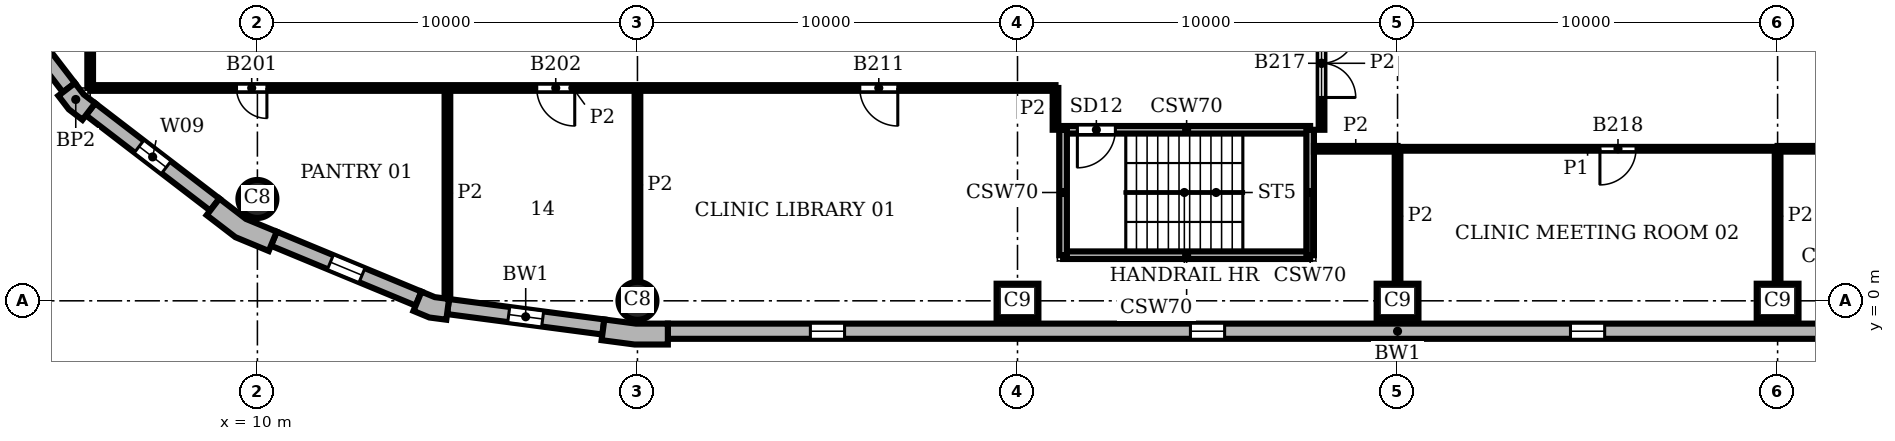
"""IFC4 building model, lengths in metres.
Left out: names, types, materials, properties, quantities, classifications, styles, units other than length and angle.
Written with IfcOpenShell. Run it as: python <this file> out.ifc"""

import sys

from ifc_helpers import new_model, si_unit, direction, frame, frame_2d, origin, origin_2d, place, context, subcontext, project, spatial, polyline, rectangle, circle, outline, extrude, element, fill, save


model = new_model("IFC4")
c1 = context("Model", 3, precision=1e-05, world=origin(), true_north=direction((0.0, 1.0)))
c2 = subcontext(c1, "Body", "Model", "MODEL_VIEW")
j1 = project(units=[si_unit("LENGTHUNIT", "METRE"), si_unit("PLANEANGLEUNIT", "RADIAN")], contexts=[c1])
p1 = place(None, origin())
s1 = spatial("IfcSite", under=j1, at=p1, CompositionType="ELEMENT")
p2 = place(p1, origin())
s2 = spatial("IfcBuilding", under=s1, at=p2, CompositionType="ELEMENT")
p3 = place(p2, frame((0.0, 0.0, 143.4)))
s3 = spatial("IfcBuildingStorey", under=s2, at=p3, CompositionType="ELEMENT", Elevation=143.4)
p4 = place(p3, frame((20.0, 0.0, 0.0), z_axis=(0.0, 0.0, 1.0), x_axis=(1.0, 0.0, 0.0)))
e1 = element("IfcColumn", 1, at=p4, inside=s3, PredefinedType="COLUMN", context=c2, shape_type="SweptSolid", body=[
    extrude(circle(Radius=0.5, at=origin_2d()), origin(), (0.0, 0.0, 1.0), 3.9),
])
for number, where, z_axis, x_axis in (
    (2, (30.0, 0.0, 0.0), (0.0, 0.0, 1.0), (1.0, 0.0, 0.0)),
    (3, (40.0, 0.0, 0.0), (0.0, 0.0, 1.0), (1.0, 0.0, 0.0)),
    (4, (50.0, 0.0, 0.0), (0.0, 0.0, 1.0), (1.0, 0.0, 0.0)),
):
    element("IfcColumn", number, at=place(p3, frame(where, z_axis=z_axis, x_axis=x_axis)), inside=s3, PredefinedType="COLUMN", context=c2, shape_type="SweptSolid", body=[
        extrude(rectangle(XDim=1.1, YDim=0.9, at=origin_2d()), origin(), (0.0, 0.0, 1.0), 3.9),
    ])
p5 = place(p3, frame((10.0, 2.679, 0.0), z_axis=(0.0, 0.0, 1.0), x_axis=(1.0, 0.0, 0.0)))
e5 = element("IfcColumn", 5, at=p5, inside=s3, PredefinedType="COLUMN", context=c2, shape_type="SweptSolid", body=[
    extrude(circle(Radius=0.5, at=origin_2d()), origin(), (0.0, 0.0, 1.0), 3.9),
])
p6 = place(p3, origin())
e6 = element("IfcWall", 6, at=p6, inside=s3, PredefinedType="SOLIDWALL", context=c2, shape_type="SweptSolid", body=[
    extrude(outline(polyline([(19.076, -0.887), (19.057, -1.036), (19.925, -1.15), (20.8, -1.15), (20.8, -1.0), (20.8, -0.6), (19.961, -0.6), (19.128, -0.49), (19.076, -0.887)])), origin(), (0.0, 0.0, 1.0), 3.9),
])
e7 = element("IfcWall", 7, at=p6, inside=s3, PredefinedType="SOLIDWALL", context=c2, shape_type="SweptSolid", body=[
    extrude(outline(polyline([(4.882, 5.487), (4.763, 5.396), (5.038, 5.038), (5.396, 4.763), (5.487, 4.882), (5.731, 5.199), (5.43, 5.43), (5.199, 5.731), (4.882, 5.487)])), origin(), (0.0, 0.0, 1.0), 3.9),
])
e8 = element("IfcWall", 8, at=p6, inside=s3, PredefinedType="SOLIDWALL", context=c2, shape_type="SweptSolid", body=[
    extrude(outline(polyline([(8.757, 2.373), (8.665, 2.254), (9.42, 1.675), (10.299, 1.311), (10.356, 1.449), (10.51, 1.819), (9.698, 2.155), (9.0, 2.69), (8.757, 2.373)])), origin(), (0.0, 0.0, 1.0), 3.9),
])
e9 = element("IfcWall", 9, at=p6, inside=s3, PredefinedType="SOLIDWALL", context=c2, shape_type="SweptSolid", body=[
    extrude(outline(polyline([(14.164, -0.128), (14.106, -0.266), (14.523, -0.439), (14.971, -0.498), (14.99, -0.349), (15.043, 0.047), (14.667, 0.097), (14.317, 0.242), (14.164, -0.128)])), origin(), (0.0, 0.0, 1.0), 3.9),
])
p7 = place(p3, frame((20.8, -0.8, 0.0), z_axis=(0.0, 0.0, 1.0), x_axis=(1.0, 0.0, 0.0)))
e10 = element("IfcWall", 10, at=p7, inside=s3, PredefinedType="SOLIDWALL", context=c2, shape_type="SweptSolid", body=[
    extrude(rectangle(XDim=38.4, YDim=0.4, at=frame_2d((19.2, 0.0))), origin(), (0.0, 0.0, 1.0), 3.9),
])
p8 = place(p7, frame((3.75, 0.0, 0.9)))
e11 = element("IfcOpeningElement", 11, at=p8, cuts=e10, PredefinedType="OPENING", context=c2, shape_type="SweptSolid", body=[
    extrude(rectangle(XDim=0.9, YDim=2.35, at=frame_2d((0.45, 1.175))), frame((0.0, 0.21, 0.0), z_axis=(0.0, -1.0, 0.0), x_axis=(1.0, 0.0, 0.0)), (0.0, 0.0, 1.0), 0.42),
])
p9 = place(p7, frame((13.75, 0.0, 0.9)))
e12 = element("IfcOpeningElement", 12, at=p9, cuts=e10, PredefinedType="OPENING", context=c2, shape_type="SweptSolid", body=[
    extrude(rectangle(XDim=0.9, YDim=2.35, at=frame_2d((0.45, 1.175))), frame((0.0, 0.21, 0.0), z_axis=(0.0, -1.0, 0.0), x_axis=(1.0, 0.0, 0.0)), (0.0, 0.0, 1.0), 0.42),
])
p10 = place(p7, frame((23.75, 0.0, 0.9)))
e13 = element("IfcOpeningElement", 13, at=p10, cuts=e10, PredefinedType="OPENING", context=c2, shape_type="SweptSolid", body=[
    extrude(rectangle(XDim=0.9, YDim=2.35, at=frame_2d((0.45, 1.175))), frame((0.0, 0.21, 0.0), z_axis=(0.0, -1.0, 0.0), x_axis=(1.0, 0.0, 0.0)), (0.0, 0.0, 1.0), 0.42),
])
p11 = place(p7, frame((33.75, 0.0, 0.9)))
e14 = element("IfcOpeningElement", 14, at=p11, cuts=e10, PredefinedType="OPENING", context=c2, shape_type="SweptSolid", body=[
    extrude(rectangle(XDim=0.9, YDim=2.35, at=frame_2d((0.45, 1.175))), frame((0.0, 0.21, 0.0), z_axis=(0.0, -1.0, 0.0), x_axis=(1.0, 0.0, 0.0)), (0.0, 0.0, 1.0), 0.42),
])
p12 = place(p3, frame((2.532, 8.878, 0.0), z_axis=(0.0, 0.0, 1.0), x_axis=(0.608759824817, -0.793354571229, 0.0)))
e15 = element("IfcWall", 15, at=p12, inside=s3, PredefinedType="SOLIDWALL", context=c2, shape_type="SweptSolid", body=[
    extrude(rectangle(XDim=4.121, YDim=0.4, at=frame_2d((2.061, 0.0))), origin(), (0.0, 0.0, 1.0), 3.9),
])
p13 = place(p12, frame((1.611, 0.0, 0.9)))
e16 = element("IfcOpeningElement", 16, at=p13, cuts=e15, PredefinedType="OPENING", context=c2, shape_type="SweptSolid", body=[
    extrude(rectangle(XDim=0.9, YDim=2.35, at=frame_2d((0.45, 1.175))), frame((0.0, 0.21, 0.0), z_axis=(0.0, -1.0, 0.0), x_axis=(1.0, 0.0, 0.0)), (0.0, 0.0, 1.0), 0.42),
])
p14 = place(p3, frame((5.609, 5.041, 0.0), z_axis=(0.0, 0.0, 1.0), x_axis=(0.793354571229, -0.608759824817, 0.0)))
e17 = element("IfcWall", 17, at=p14, inside=s3, PredefinedType="SOLIDWALL", context=c2, shape_type="SweptSolid", body=[
    extrude(rectangle(XDim=4.121, YDim=0.4, at=frame_2d((2.061, 0.0))), origin(), (0.0, 0.0, 1.0), 3.9),
])
p15 = place(p14, frame((1.611, 0.0, 0.9)))
e18 = element("IfcOpeningElement", 18, at=p15, cuts=e17, PredefinedType="OPENING", context=c2, shape_type="SweptSolid", body=[
    extrude(rectangle(XDim=0.9, YDim=2.35, at=frame_2d((0.45, 1.175))), frame((0.0, 0.21, 0.0), z_axis=(0.0, -1.0, 0.0), x_axis=(1.0, 0.0, 0.0)), (0.0, 0.0, 1.0), 0.42),
])
p16 = place(p3, frame((10.433, 1.634, 0.0), z_axis=(0.0, 0.0, 1.0), x_axis=(0.923863744394, -0.382721546029, 0.0)))
e19 = element("IfcWall", 19, at=p16, inside=s3, PredefinedType="SOLIDWALL", context=c2, shape_type="SweptSolid", body=[
    extrude(rectangle(XDim=4.121, YDim=0.4, at=frame_2d((2.061, 0.0))), origin(), (0.0, 0.0, 1.0), 3.9),
])
p17 = place(p16, frame((1.611, 0.0, 0.9)))
e20 = element("IfcOpeningElement", 20, at=p17, cuts=e19, PredefinedType="OPENING", context=c2, shape_type="SweptSolid", body=[
    extrude(rectangle(XDim=0.9, YDim=2.35, at=frame_2d((0.45, 1.175))), frame((0.0, 0.21, 0.0), z_axis=(0.0, -1.0, 0.0), x_axis=(1.0, 0.0, 0.0)), (0.0, 0.0, 1.0), 0.42),
])
p18 = place(p3, frame((15.017, -0.151, 0.0), z_axis=(0.0, 0.0, 1.0), x_axis=(0.991446429508, -0.130514280502, 0.0)))
e21 = element("IfcWall", 21, at=p18, inside=s3, PredefinedType="SOLIDWALL", context=c2, shape_type="SweptSolid", body=[
    extrude(rectangle(XDim=4.121, YDim=0.4, at=frame_2d((2.061, 0.0))), origin(), (0.0, 0.0, 1.0), 3.9),
])
p19 = place(p18, frame((1.611, 0.0, 0.9)))
e22 = element("IfcOpeningElement", 22, at=p19, cuts=e21, PredefinedType="OPENING", context=c2, shape_type="SweptSolid", body=[
    extrude(rectangle(XDim=0.9, YDim=2.35, at=frame_2d((0.45, 1.175))), frame((0.0, 0.21, 0.0), z_axis=(0.0, -1.0, 0.0), x_axis=(1.0, 0.0, 0.0)), (0.0, 0.0, 1.0), 0.42),
])
p20 = place(p3, frame((31.2, 1.2, 0.0), z_axis=(0.0, 0.0, 1.0), x_axis=(1.0, 0.0, 0.0)))
e23 = element("IfcWall", 23, at=p20, inside=s3, PredefinedType="SHEAR", context=c2, shape_type="SweptSolid", body=[
    extrude(rectangle(XDim=6.5, YDim=0.2, at=frame_2d((3.25, 0.0))), origin(), (0.0, 0.0, 1.0), 3.58),
])
p21 = place(p3, frame((31.2, 4.5, 0.0), z_axis=(0.0, 0.0, 1.0), x_axis=(1.0, 0.0, 0.0)))
e24 = element("IfcWall", 24, at=p21, inside=s3, PredefinedType="SHEAR", context=c2, shape_type="SweptSolid", body=[
    extrude(rectangle(XDim=6.5, YDim=0.2, at=frame_2d((3.25, 0.0))), origin(), (0.0, 0.0, 1.0), 3.58),
])
p22 = place(p21, frame((0.375, 0.0, 0.0)))
e25 = element("IfcOpeningElement", 25, at=p22, cuts=e24, PredefinedType="OPENING", context=c2, shape_type="SweptSolid", body=[
    extrude(rectangle(XDim=1.0, YDim=2.1, at=frame_2d((0.5, 1.05))), frame((0.0, 0.11, 0.0), z_axis=(0.0, -1.0, 0.0), x_axis=(1.0, 0.0, 0.0)), (0.0, 0.0, 1.0), 0.22),
])
for number, where, z_axis, x_axis in (
    (26, (31.2, 1.2, 0.0), (0.0, 0.0, 1.0), (0.0, 1.0, 0.0)),
    (27, (37.7, 1.2, 0.0), (0.0, 0.0, 1.0), (0.0, 1.0, 0.0)),
):
    element("IfcWall", number, at=place(p3, frame(where, z_axis=z_axis, x_axis=x_axis)), inside=s3, PredefinedType="SHEAR", context=c2, shape_type="SweptSolid", body=[
        extrude(rectangle(XDim=3.3, YDim=0.2, at=frame_2d((1.65, 0.0))), origin(), (0.0, 0.0, 1.0), 3.58),
    ])
p23 = place(p3, frame((40.0, 4.0, 0.0), z_axis=(0.0, 0.0, 1.0), x_axis=(1.0, 0.0, 0.0)))
e28 = element("IfcWall", 28, at=p23, inside=s3, PredefinedType="PARTITIONING", context=c2, shape_type="SweptSolid", body=[
    extrude(rectangle(XDim=10.0, YDim=0.1, at=frame_2d((5.0, 0.0))), origin(), (0.0, 0.0, 1.0), 3.58),
])
p24 = place(p23, frame((5.325, 0.0, 0.0)))
e29 = element("IfcOpeningElement", 29, at=p24, cuts=e28, PredefinedType="OPENING", context=c2, shape_type="SweptSolid", body=[
    extrude(rectangle(XDim=0.95, YDim=2.1, at=frame_2d((0.475, 1.05))), frame((0.0, 0.06, 0.0), z_axis=(0.0, -1.0, 0.0), x_axis=(1.0, 0.0, 0.0)), (0.0, 0.0, 1.0), 0.12),
])
p25 = place(p3, frame((5.6, 5.6, 0.0), z_axis=(0.0, 0.0, 1.0), x_axis=(0.0, 1.0, 0.0)))
e30 = element("IfcWall", 30, at=p25, inside=s3, PredefinedType="PARTITIONING", context=c2, shape_type="SweptSolid", body=[
    extrude(rectangle(XDim=22.4, YDim=0.15, at=frame_2d((11.2, 0.0))), origin(), (0.0, 0.0, 1.0), 3.58),
])
p26 = place(p25, frame((12.35, 0.0, 0.0)))
e31 = element("IfcOpeningElement", 31, at=p26, cuts=e30, PredefinedType="OPENING", context=c2, shape_type="SweptSolid", body=[
    extrude(rectangle(XDim=1.8, YDim=2.1, at=frame_2d((0.9, 1.05))), frame((0.0, 0.085, 0.0), z_axis=(0.0, -1.0, 0.0), x_axis=(1.0, 0.0, 0.0)), (0.0, 0.0, 1.0), 0.17),
])
p27 = place(p3, frame((15.0, 0.063, 0.0), z_axis=(0.0, 0.0, 1.0), x_axis=(0.0, 1.0, 0.0)))
e32 = element("IfcWall", 32, at=p27, inside=s3, PredefinedType="PARTITIONING", context=c2, shape_type="SweptSolid", body=[
    extrude(rectangle(XDim=5.537, YDim=0.15, at=frame_2d((2.769, 0.0))), origin(), (0.0, 0.0, 1.0), 3.58),
])
p28 = place(p3, frame((20.0, 0.5, 0.0), z_axis=(0.0, 0.0, 1.0), x_axis=(0.0, 1.0, 0.0)))
e33 = element("IfcWall", 33, at=p28, inside=s3, PredefinedType="PARTITIONING", context=c2, shape_type="SweptSolid", body=[
    extrude(rectangle(XDim=5.1, YDim=0.15, at=frame_2d((2.55, 0.0))), origin(), (0.0, 0.0, 1.0), 3.58),
])
p29 = place(p3, frame((31.0, 4.501, 0.0), z_axis=(0.0, 0.0, 1.0), x_axis=(0.0, 1.0, 0.0)))
e34 = element("IfcWall", 34, at=p29, inside=s3, PredefinedType="PARTITIONING", context=c2, shape_type="SweptSolid", body=[
    extrude(rectangle(XDim=1.099, YDim=0.15, at=frame_2d((0.55, 0.0))), origin(), (0.0, 0.0, 1.0), 3.58),
])
p30 = place(p3, frame((38.0, 4.5, 0.0), z_axis=(0.0, 0.0, 1.0), x_axis=(0.0, 1.0, 0.0)))
e35 = element("IfcWall", 35, at=p30, inside=s3, PredefinedType="PARTITIONING", context=c2, shape_type="SweptSolid", body=[
    extrude(rectangle(XDim=3.5, YDim=0.15, at=frame_2d((1.75, 0.0))), origin(), (0.0, 0.0, 1.0), 3.58),
])
p31 = place(p30, frame((0.85, 0.0, 0.0)))
e36 = element("IfcOpeningElement", 36, at=p31, cuts=e35, PredefinedType="OPENING", context=c2, shape_type="SweptSolid", body=[
    extrude(rectangle(XDim=1.8, YDim=2.1, at=frame_2d((0.9, 1.05))), frame((0.0, 0.085, 0.0), z_axis=(0.0, -1.0, 0.0), x_axis=(1.0, 0.0, 0.0)), (0.0, 0.0, 1.0), 0.17),
])
for number, where, z_axis, x_axis in (
    (37, (40.0, 0.45, 0.0), (0.0, 0.0, 1.0), (0.0, 1.0, 0.0)),
    (38, (50.0, 0.45, 0.0), (0.0, 0.0, 1.0), (0.0, 1.0, 0.0)),
):
    element("IfcWall", number, at=place(p3, frame(where, z_axis=z_axis, x_axis=x_axis)), inside=s3, PredefinedType="PARTITIONING", context=c2, shape_type="SweptSolid", body=[
        extrude(rectangle(XDim=3.55, YDim=0.15, at=frame_2d((1.775, 0.0))), origin(), (0.0, 0.0, 1.0), 3.58),
    ])
p32 = place(p3, frame((37.8, 4.0, 0.0), z_axis=(0.0, 0.0, 1.0), x_axis=(1.0, 0.0, 0.0)))
e39 = element("IfcWall", 39, at=p32, inside=s3, PredefinedType="PARTITIONING", context=c2, shape_type="SweptSolid", body=[
    extrude(rectangle(XDim=2.2, YDim=0.15, at=frame_2d((1.1, 0.0))), origin(), (0.0, 0.0, 1.0), 3.58),
])
p33 = place(p3, frame((50.0, 4.0, 0.0), z_axis=(0.0, 0.0, 1.0), x_axis=(1.0, 0.0, 0.0)))
e40 = element("IfcWall", 40, at=p33, inside=s3, PredefinedType="PARTITIONING", context=c2, shape_type="SweptSolid", body=[
    extrude(rectangle(XDim=5.0, YDim=0.15, at=frame_2d((2.5, 0.0))), origin(), (0.0, 0.0, 1.0), 3.58),
])
p34 = place(p3, frame((5.6, 5.6, 0.0), z_axis=(0.0, 0.0, 1.0), x_axis=(1.0, 0.0, 0.0)))
e41 = element("IfcWall", 41, at=p34, inside=s3, PredefinedType="PARTITIONING", context=c2, shape_type="SweptSolid", body=[
    extrude(rectangle(XDim=25.4, YDim=0.15, at=frame_2d((12.7, 0.0))), origin(), (0.0, 0.0, 1.0), 3.58),
])
p35 = place(p34, frame((3.85, 0.0, 0.0)))
e42 = element("IfcOpeningElement", 42, at=p35, cuts=e41, PredefinedType="OPENING", context=c2, shape_type="SweptSolid", body=[
    extrude(rectangle(XDim=0.8, YDim=2.1, at=frame_2d((0.4, 1.05))), frame((0.0, 0.085, 0.0), z_axis=(0.0, -1.0, 0.0), x_axis=(1.0, 0.0, 0.0)), (0.0, 0.0, 1.0), 0.17),
])
p36 = place(p34, frame((11.75, 0.0, 0.0)))
e43 = element("IfcOpeningElement", 43, at=p36, cuts=e41, PredefinedType="OPENING", context=c2, shape_type="SweptSolid", body=[
    extrude(rectangle(XDim=1.0, YDim=2.1, at=frame_2d((0.5, 1.05))), frame((0.0, 0.085, 0.0), z_axis=(0.0, -1.0, 0.0), x_axis=(1.0, 0.0, 0.0)), (0.0, 0.0, 1.0), 0.17),
])
p37 = place(p34, frame((20.25, 0.0, 0.0)))
e44 = element("IfcOpeningElement", 44, at=p37, cuts=e41, PredefinedType="OPENING", context=c2, shape_type="SweptSolid", body=[
    extrude(rectangle(XDim=1.0, YDim=2.1, at=frame_2d((0.5, 1.05))), frame((0.0, 0.085, 0.0), z_axis=(0.0, -1.0, 0.0), x_axis=(1.0, 0.0, 0.0)), (0.0, 0.0, 1.0), 0.17),
])
p38 = place(p8, origin())
e45 = element("IfcWindow", 45, at=p38, inside=s3, PartitioningType="SINGLE_PANEL", PredefinedType="WINDOW", context=c2, shape_type="SweptSolid", body=[
    extrude(rectangle(XDim=0.9, YDim=2.35, at=frame_2d((0.45, 1.175))), frame((0.0, 0.16, 0.0), z_axis=(0.0, -1.0, 0.0), x_axis=(1.0, 0.0, 0.0)), (0.0, 0.0, 1.0), 0.06),
])
fill(e11, e45)
p39 = place(p9, origin())
e46 = element("IfcWindow", 46, at=p39, inside=s3, PartitioningType="SINGLE_PANEL", PredefinedType="WINDOW", context=c2, shape_type="SweptSolid", body=[
    extrude(rectangle(XDim=0.9, YDim=2.35, at=frame_2d((0.45, 1.175))), frame((0.0, 0.16, 0.0), z_axis=(0.0, -1.0, 0.0), x_axis=(1.0, 0.0, 0.0)), (0.0, 0.0, 1.0), 0.06),
])
fill(e12, e46)
p40 = place(p10, origin())
e47 = element("IfcWindow", 47, at=p40, inside=s3, PartitioningType="SINGLE_PANEL", PredefinedType="WINDOW", context=c2, shape_type="SweptSolid", body=[
    extrude(rectangle(XDim=0.9, YDim=2.35, at=frame_2d((0.45, 1.175))), frame((0.0, 0.16, 0.0), z_axis=(0.0, -1.0, 0.0), x_axis=(1.0, 0.0, 0.0)), (0.0, 0.0, 1.0), 0.06),
])
fill(e13, e47)
p41 = place(p15, origin())
e48 = element("IfcWindow", 48, at=p41, inside=s3, PartitioningType="SINGLE_PANEL", PredefinedType="WINDOW", context=c2, shape_type="SweptSolid", body=[
    extrude(rectangle(XDim=0.9, YDim=2.35, at=frame_2d((0.45, 1.175))), frame((0.0, 0.16, 0.0), z_axis=(0.0, -1.0, 0.0), x_axis=(1.0, 0.0, 0.0)), (0.0, 0.0, 1.0), 0.06),
])
fill(e18, e48)
p42 = place(p17, origin())
e49 = element("IfcWindow", 49, at=p42, inside=s3, PartitioningType="SINGLE_PANEL", PredefinedType="WINDOW", context=c2, shape_type="SweptSolid", body=[
    extrude(rectangle(XDim=0.9, YDim=2.35, at=frame_2d((0.45, 1.175))), frame((0.0, 0.16, 0.0), z_axis=(0.0, -1.0, 0.0), x_axis=(1.0, 0.0, 0.0)), (0.0, 0.0, 1.0), 0.06),
])
fill(e20, e49)
p43 = place(p19, origin())
e50 = element("IfcWindow", 50, at=p43, inside=s3, PartitioningType="SINGLE_PANEL", PredefinedType="WINDOW", context=c2, shape_type="SweptSolid", body=[
    extrude(rectangle(XDim=0.9, YDim=2.35, at=frame_2d((0.45, 1.175))), frame((0.0, 0.16, 0.0), z_axis=(0.0, -1.0, 0.0), x_axis=(1.0, 0.0, 0.0)), (0.0, 0.0, 1.0), 0.06),
])
fill(e22, e50)
p44 = place(p22, frame((1.0, 0.0, 0.0), z_axis=(0.0, 0.0, 1.0), x_axis=(-1.0, 0.0, 0.0)))
e51 = element("IfcDoor", 51, at=p44, inside=s3, OperationType="SINGLE_SWING_RIGHT", PredefinedType="DOOR", context=c2, shape_type="SweptSolid", body=[
    extrude(rectangle(XDim=1.0, YDim=2.1, at=frame_2d((0.5, 1.05))), frame((0.0, 0.025, 0.0), z_axis=(0.0, -1.0, 0.0), x_axis=(1.0, 0.0, 0.0)), (0.0, 0.0, 1.0), 0.05),
])
fill(e25, e51)
p45 = place(p35, frame((0.8, 0.0, 0.0), z_axis=(0.0, 0.0, 1.0), x_axis=(-1.0, 0.0, 0.0)))
e52 = element("IfcDoor", 52, at=p45, inside=s3, OperationType="SINGLE_SWING_LEFT", PredefinedType="DOOR", context=c2, shape_type="SweptSolid", body=[
    extrude(rectangle(XDim=0.8, YDim=2.1, at=frame_2d((0.4, 1.05))), frame((0.0, 0.025, 0.0), z_axis=(0.0, -1.0, 0.0), x_axis=(1.0, 0.0, 0.0)), (0.0, 0.0, 1.0), 0.05),
])
fill(e42, e52)
p46 = place(p36, frame((1.0, 0.0, 0.0), z_axis=(0.0, 0.0, 1.0), x_axis=(-1.0, 0.0, 0.0)))
e53 = element("IfcDoor", 53, at=p46, inside=s3, OperationType="SINGLE_SWING_LEFT", PredefinedType="DOOR", context=c2, shape_type="SweptSolid", body=[
    extrude(rectangle(XDim=1.0, YDim=2.1, at=frame_2d((0.5, 1.05))), frame((0.0, 0.025, 0.0), z_axis=(0.0, -1.0, 0.0), x_axis=(1.0, 0.0, 0.0)), (0.0, 0.0, 1.0), 0.05),
])
fill(e43, e53)
p47 = place(p37, frame((1.0, 0.0, 0.0), z_axis=(0.0, 0.0, 1.0), x_axis=(-1.0, 0.0, 0.0)))
e54 = element("IfcDoor", 54, at=p47, inside=s3, OperationType="SINGLE_SWING_LEFT", PredefinedType="DOOR", context=c2, shape_type="SweptSolid", body=[
    extrude(rectangle(XDim=1.0, YDim=2.1, at=frame_2d((0.5, 1.05))), frame((0.0, 0.025, 0.0), z_axis=(0.0, -1.0, 0.0), x_axis=(1.0, 0.0, 0.0)), (0.0, 0.0, 1.0), 0.05),
])
fill(e44, e54)
p48 = place(p31, frame((1.8, 0.0, 0.0), z_axis=(0.0, 0.0, 1.0), x_axis=(-1.0, 0.0, 0.0)))
e55 = element("IfcDoor", 55, at=p48, inside=s3, OperationType="DOUBLE_DOOR_SINGLE_SWING", PredefinedType="DOOR", context=c2, shape_type="SweptSolid", body=[
    extrude(rectangle(XDim=1.8, YDim=2.1, at=frame_2d((0.9, 1.05))), frame((0.0, 0.025, 0.0), z_axis=(0.0, -1.0, 0.0), x_axis=(1.0, 0.0, 0.0)), (0.0, 0.0, 1.0), 0.05),
])
fill(e36, e55)
p49 = place(p24, frame((0.95, 0.0, 0.0), z_axis=(0.0, 0.0, 1.0), x_axis=(-1.0, 0.0, 0.0)))
e56 = element("IfcDoor", 56, at=p49, inside=s3, OperationType="SINGLE_SWING_RIGHT", PredefinedType="DOOR", context=c2, shape_type="SweptSolid", body=[
    extrude(rectangle(XDim=0.95, YDim=2.1, at=frame_2d((0.475, 1.05))), frame((0.0, 0.025, 0.0), z_axis=(0.0, -1.0, 0.0), x_axis=(1.0, 0.0, 0.0)), (0.0, 0.0, 1.0), 0.05),
])
fill(e29, e56)
save(model, sys.argv[1])
